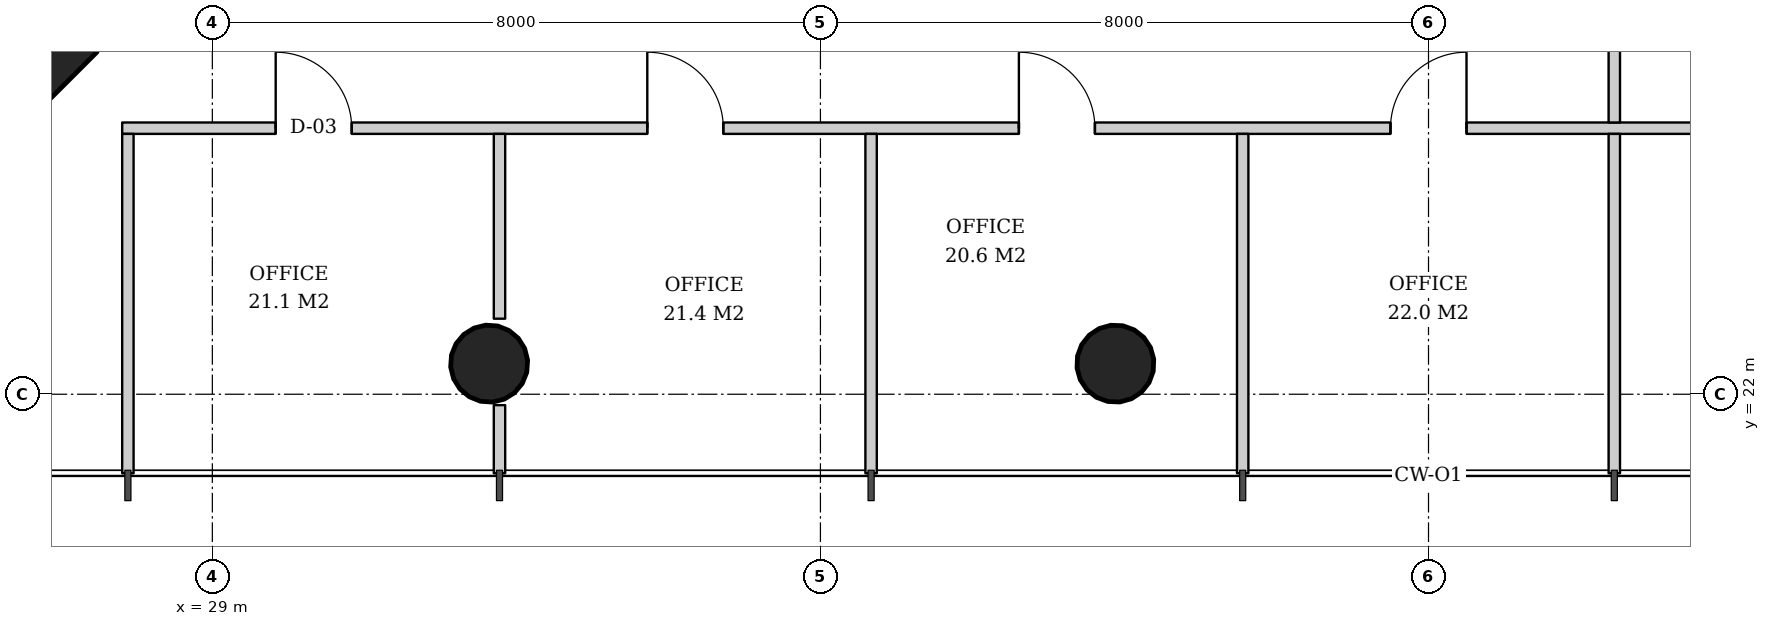
"""IFC4 building model, lengths in metres.
Left out: names, types, materials, properties, quantities, classifications, styles, units other than length and angle.
Written with IfcOpenShell. Run it as: python <this file> out.ifc"""

import sys

from ifc_helpers import new_model, si_unit, direction, frame, frame_2d, origin, origin_2d, place, context, subcontext, project, spatial, rectangle, hollow_circle, extrude, element, fill, save


model = new_model("IFC4")
c1 = context("Model", 3, precision=1e-05, world=origin(), true_north=direction((0.0, 1.0)))
c2 = subcontext(c1, "Body", "Model", "MODEL_VIEW")
j1 = project(units=[si_unit("LENGTHUNIT", "METRE"), si_unit("PLANEANGLEUNIT", "RADIAN")], contexts=[c1])
p1 = place(None, origin())
s1 = spatial("IfcSite", under=j1, at=p1, CompositionType="ELEMENT")
p2 = place(p1, origin())
s2 = spatial("IfcBuilding", under=s1, at=p2, CompositionType="ELEMENT")
p3 = place(p2, frame((0.0, 0.0, 32.4)))
s3 = spatial("IfcBuildingStorey", under=s2, at=p3, CompositionType="ELEMENT", Elevation=32.4)
p4 = place(p3, frame((25.464, 26.464, 0.0), z_axis=(0.031898107953, 0.031898107953, 0.998981992539), x_axis=(-0.707106781187, 0.707106781187, 0.0)))
e1 = element("IfcColumn", 1, at=p4, inside=s3, PredefinedType="COLUMN", context=c2, shape_type="SweptSolid", body=[
    extrude(rectangle(XDim=2.8, YDim=2.8, at=origin_2d()), origin(), (0.0, 0.0, 1.0), 3.804),
])
p5 = place(p3, frame((32.619, 22.364, 0.0), z_axis=(0.019132263625, 0.031908506785, 0.999307662176), x_axis=(-0.857645150882, 0.514241961696, 0.0)))
e2 = element("IfcColumn", 2, at=p5, inside=s3, PredefinedType="COLUMN", context=c2, shape_type="SweptSolid", body=[
    extrude(hollow_circle(Radius=0.508, WallThickness=0.04, at=origin_2d()), origin(), (0.0, 0.0, 1.0), 3.803),
])
p6 = place(p3, frame((40.873, 22.364, 0.0), z_axis=(0.006421265669, 0.031913690376, 0.999470001408), x_axis=(-0.980352414563, 0.197254006954, 0.0)))
e3 = element("IfcColumn", 3, at=p6, inside=s3, PredefinedType="COLUMN", context=c2, shape_type="SweptSolid", body=[
    extrude(hollow_circle(Radius=0.508, WallThickness=0.04, at=origin_2d()), origin(), (0.0, 0.0, 1.0), 3.802),
])
p7 = place(p3, frame((27.814, 25.5, 0.0), z_axis=(0.0, 0.0, 1.0), x_axis=(1.0, 0.0, 0.0)))
e4 = element("IfcWall", 4, at=p7, inside=s3, PredefinedType="PARTITIONING", context=c2, shape_type="SweptSolid", body=[
    extrude(rectangle(XDim=34.372, YDim=0.15, at=frame_2d((17.186, 0.0))), origin(), (0.0, 0.0, 1.0), 2.612),
])
p8 = place(p7, frame((2.02, 0.0, 0.0)))
e5 = element("IfcOpeningElement", 5, at=p8, cuts=e4, PredefinedType="OPENING", context=c2, shape_type="SweptSolid", body=[
    extrude(rectangle(XDim=1.0, YDim=2.1, at=frame_2d((0.5, 1.05))), frame((0.0, 0.085, 0.0), z_axis=(0.0, -1.0, 0.0), x_axis=(1.0, 0.0, 0.0)), (0.0, 0.0, 1.0), 0.17),
])
p9 = place(p7, frame((6.908, 0.0, 0.0)))
e6 = element("IfcOpeningElement", 6, at=p9, cuts=e4, PredefinedType="OPENING", context=c2, shape_type="SweptSolid", body=[
    extrude(rectangle(XDim=1.0, YDim=2.1, at=frame_2d((0.5, 1.05))), frame((0.0, 0.085, 0.0), z_axis=(0.0, -1.0, 0.0), x_axis=(1.0, 0.0, 0.0)), (0.0, 0.0, 1.0), 0.17),
])
p10 = place(p7, frame((11.797, 0.0, 0.0)))
e7 = element("IfcOpeningElement", 7, at=p10, cuts=e4, PredefinedType="OPENING", context=c2, shape_type="SweptSolid", body=[
    extrude(rectangle(XDim=1.0, YDim=2.1, at=frame_2d((0.5, 1.05))), frame((0.0, 0.085, 0.0), z_axis=(0.0, -1.0, 0.0), x_axis=(1.0, 0.0, 0.0)), (0.0, 0.0, 1.0), 0.17),
])
p11 = place(p7, frame((16.686, 0.0, 0.0)))
e8 = element("IfcOpeningElement", 8, at=p11, cuts=e4, PredefinedType="OPENING", context=c2, shape_type="SweptSolid", body=[
    extrude(rectangle(XDim=1.0, YDim=2.1, at=frame_2d((0.5, 1.05))), frame((0.0, 0.085, 0.0), z_axis=(0.0, -1.0, 0.0), x_axis=(1.0, 0.0, 0.0)), (0.0, 0.0, 1.0), 0.17),
])
p12 = place(p7, frame((21.575, 0.0, 0.0)))
e9 = element("IfcOpeningElement", 9, at=p12, cuts=e4, PredefinedType="OPENING", context=c2, shape_type="SweptSolid", body=[
    extrude(rectangle(XDim=1.0, YDim=2.1, at=frame_2d((0.5, 1.05))), frame((0.0, 0.085, 0.0), z_axis=(0.0, -1.0, 0.0), x_axis=(1.0, 0.0, 0.0)), (0.0, 0.0, 1.0), 0.17),
])
p13 = place(p7, frame((26.464, 0.0, 0.0)))
e10 = element("IfcOpeningElement", 10, at=p13, cuts=e4, PredefinedType="OPENING", context=c2, shape_type="SweptSolid", body=[
    extrude(rectangle(XDim=1.0, YDim=2.1, at=frame_2d((0.5, 1.05))), frame((0.0, 0.085, 0.0), z_axis=(0.0, -1.0, 0.0), x_axis=(1.0, 0.0, 0.0)), (0.0, 0.0, 1.0), 0.17),
])
p14 = place(p7, frame((31.353, 0.0, 0.0)))
e11 = element("IfcOpeningElement", 11, at=p14, cuts=e4, PredefinedType="OPENING", context=c2, shape_type="SweptSolid", body=[
    extrude(rectangle(XDim=1.0, YDim=2.1, at=frame_2d((0.5, 1.05))), frame((0.0, 0.085, 0.0), z_axis=(0.0, -1.0, 0.0), x_axis=(1.0, 0.0, 0.0)), (0.0, 0.0, 1.0), 0.17),
])
p15 = place(p3, frame((27.889, 25.425, 0.0), z_axis=(0.0, 0.0, 1.0), x_axis=(0.0, -1.0, 0.0)))
e12 = element("IfcWall", 12, at=p15, inside=s3, PredefinedType="PARTITIONING", context=c2, shape_type="SweptSolid", body=[
    extrude(rectangle(XDim=4.465, YDim=0.15, at=frame_2d((2.232, 0.0))), origin(), (0.0, 0.0, 1.0), 3.02),
])
p16 = place(p3, frame((32.778, 25.425, 0.0), z_axis=(0.0, 0.0, 1.0), x_axis=(0.0, -1.0, 0.0)))
e13 = element("IfcWall", 13, at=p16, inside=s3, PredefinedType="PARTITIONING", context=c2, shape_type="SweptSolid", body=[
    extrude(rectangle(XDim=2.431, YDim=0.15, at=frame_2d((1.216, 0.0))), origin(), (0.0, 0.0, 1.0), 3.62),
])
p17 = place(p3, frame((32.778, 21.856, 0.0), z_axis=(0.0, 0.0, 1.0), x_axis=(0.0, -1.0, 0.0)))
e14 = element("IfcWall", 14, at=p17, inside=s3, PredefinedType="PARTITIONING", context=c2, shape_type="SweptSolid", body=[
    extrude(rectangle(XDim=0.896, YDim=0.15, at=frame_2d((0.448, 0.0))), origin(), (0.0, 0.0, 1.0), 3.62),
])
for number, where, z_axis, x_axis in (
    (15, (37.667, 25.425, 0.0), (0.0, 0.0, 1.0), (0.0, -1.0, 0.0)),
    (16, (42.556, 25.425, 0.0), (0.0, 0.0, 1.0), (0.0, -1.0, 0.0)),
    (17, (47.444, 25.425, 0.0), (0.0, 0.0, 1.0), (0.0, -1.0, 0.0)),
):
    element("IfcWall", number, at=place(p3, frame(where, z_axis=z_axis, x_axis=x_axis)), inside=s3, PredefinedType="PARTITIONING", context=c2, shape_type="SweptSolid", body=[
        extrude(rectangle(XDim=4.465, YDim=0.15, at=frame_2d((2.232, 0.0))), origin(), (0.0, 0.0, 1.0), 3.02),
    ])
p18 = place(p3, frame((47.444, 30.35, 0.0), z_axis=(0.0, 0.0, 1.0), x_axis=(0.0, -1.0, 0.0)))
e18 = element("IfcWall", 18, at=p18, inside=s3, PredefinedType="PARTITIONING", context=c2, shape_type="SweptSolid", body=[
    extrude(rectangle(XDim=4.775, YDim=0.15, at=frame_2d((2.388, 0.0))), origin(), (0.0, 0.0, 1.0), 3.62),
])
p19 = place(p8, origin())
e19 = element("IfcDoor", 19, at=p19, inside=s3, OperationType="SINGLE_SWING_LEFT", PredefinedType="DOOR", context=c2, shape_type="SweptSolid", body=[
    extrude(rectangle(XDim=1.0, YDim=2.1, at=frame_2d((0.5, 1.05))), frame((0.0, 0.025, 0.0), z_axis=(0.0, -1.0, 0.0), x_axis=(1.0, 0.0, 0.0)), (0.0, 0.0, 1.0), 0.05),
])
fill(e5, e19)
p20 = place(p9, origin())
e20 = element("IfcDoor", 20, at=p20, inside=s3, OperationType="SINGLE_SWING_LEFT", PredefinedType="DOOR", context=c2, shape_type="SweptSolid", body=[
    extrude(rectangle(XDim=1.0, YDim=2.1, at=frame_2d((0.5, 1.05))), frame((0.0, 0.025, 0.0), z_axis=(0.0, -1.0, 0.0), x_axis=(1.0, 0.0, 0.0)), (0.0, 0.0, 1.0), 0.05),
])
fill(e6, e20)
p21 = place(p10, origin())
e21 = element("IfcDoor", 21, at=p21, inside=s3, OperationType="SINGLE_SWING_LEFT", PredefinedType="DOOR", context=c2, shape_type="SweptSolid", body=[
    extrude(rectangle(XDim=1.0, YDim=2.1, at=frame_2d((0.5, 1.05))), frame((0.0, 0.025, 0.0), z_axis=(0.0, -1.0, 0.0), x_axis=(1.0, 0.0, 0.0)), (0.0, 0.0, 1.0), 0.05),
])
fill(e7, e21)
p22 = place(p11, origin())
e22 = element("IfcDoor", 22, at=p22, inside=s3, OperationType="SINGLE_SWING_RIGHT", PredefinedType="DOOR", context=c2, shape_type="SweptSolid", body=[
    extrude(rectangle(XDim=1.0, YDim=2.1, at=frame_2d((0.5, 1.05))), frame((0.0, 0.025, 0.0), z_axis=(0.0, -1.0, 0.0), x_axis=(1.0, 0.0, 0.0)), (0.0, 0.0, 1.0), 0.05),
])
fill(e8, e22)
save(model, sys.argv[1])
